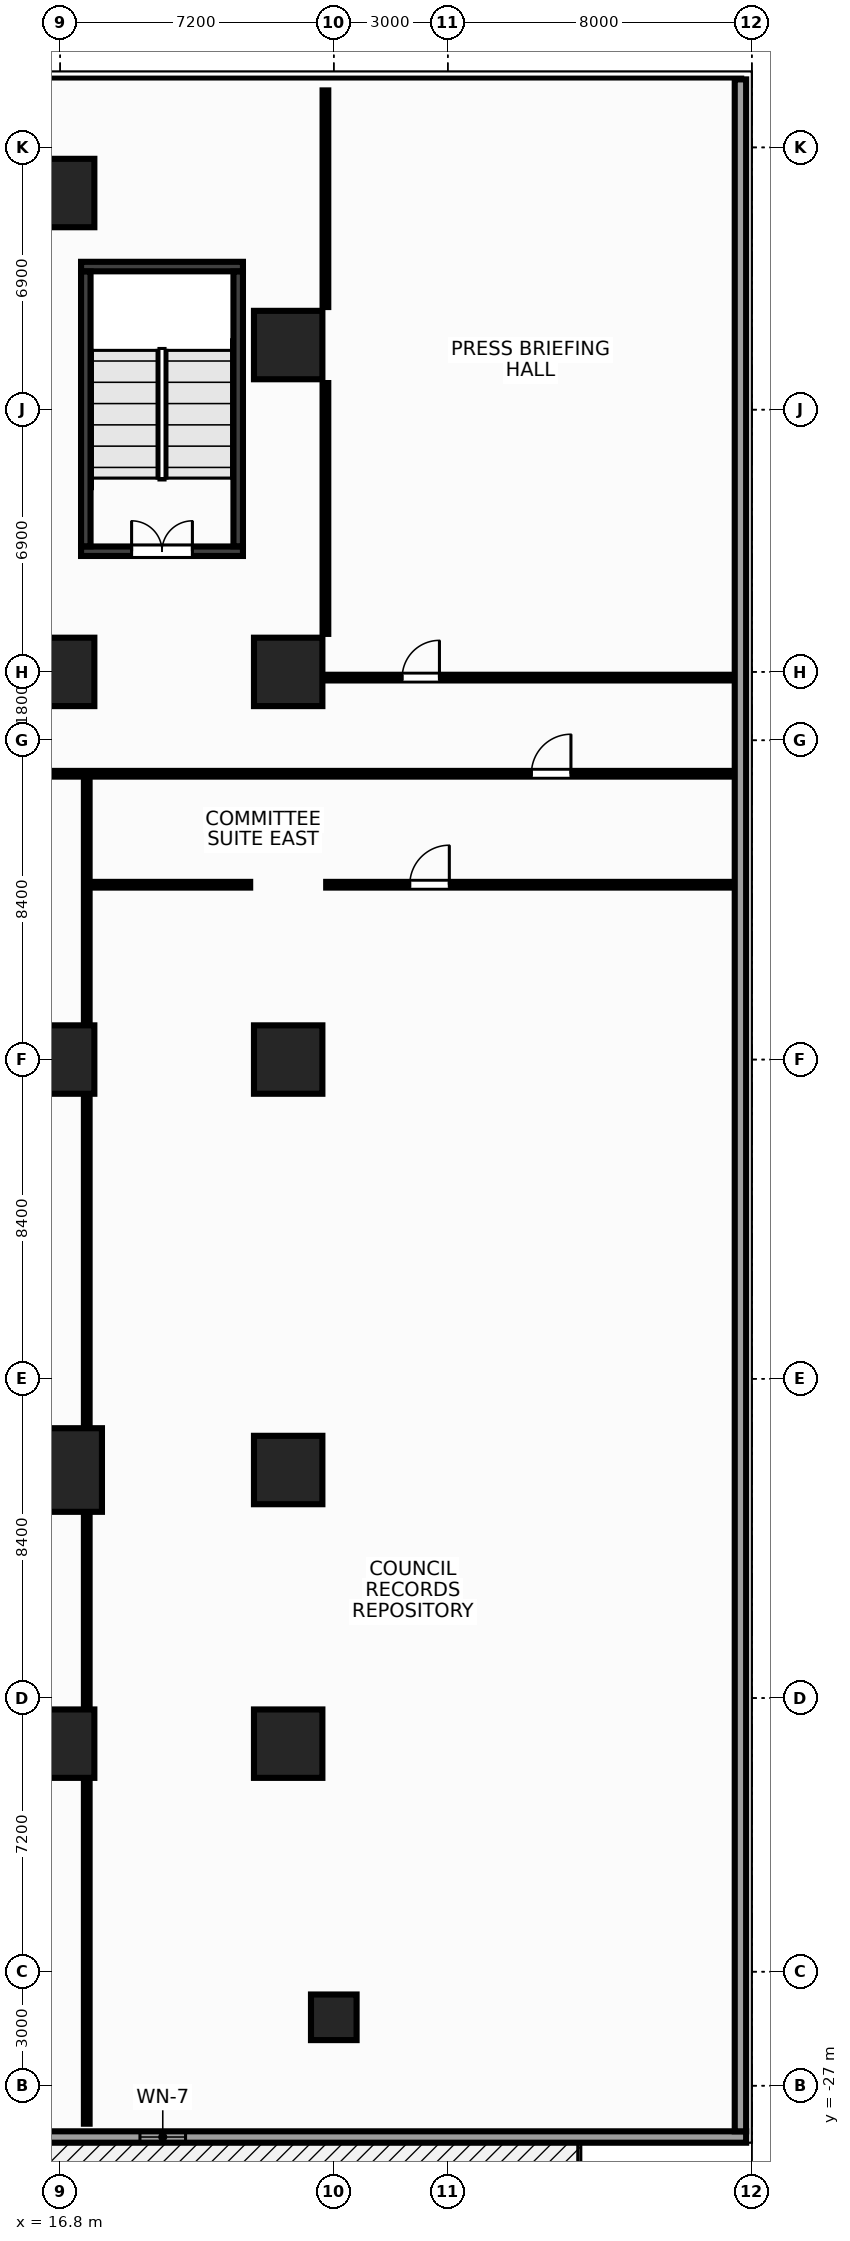
"""IFC4 building model, lengths in metres.
Left out: names, types, materials, properties, quantities, classifications, styles, units other than length and angle.
Written with IfcOpenShell. Run it as: python <this file> out.ifc"""

import sys

from ifc_helpers import new_model, si_unit, direction, frame, frame_2d, origin, origin_2d, place, context, subcontext, project, spatial, rectangle, hollow_rectangle, extrude, source, transform, mapped, element, fill, save


model = new_model("IFC4")
c1 = context("Model", 3, precision=1e-05, world=origin(), true_north=direction((0.0, 1.0)))
c2 = subcontext(c1, "Body", "Model", "MODEL_VIEW")
j1 = project(units=[si_unit("LENGTHUNIT", "METRE"), si_unit("PLANEANGLEUNIT", "RADIAN")], contexts=[c1])
p1 = place(None, origin())
s1 = spatial("IfcSite", under=j1, at=p1, CompositionType="ELEMENT")
p2 = place(p1, origin())
s2 = spatial("IfcBuilding", under=s1, at=p2, CompositionType="ELEMENT")
p3 = place(p2, frame((0.0, 0.0, 9.65)))
s3 = spatial("IfcBuildingStorey", under=s2, at=p3, CompositionType="ELEMENT", Elevation=9.65)
m1 = source(origin(), c2, "Body", "SweptSolid", [
    extrude(rectangle(XDim=4.26, YDim=0.25, at=frame_2d((2.13, 0.0))), origin(), (0.0, 0.0, 1.0), 4.65),
])
p4 = place(p3, frame((17.35, 20.865, 0.0), z_axis=(0.0, 0.0, 1.0), x_axis=(1.0, 0.0, 0.0)))
e1 = element("IfcWall", 1, at=p4, inside=s3, PredefinedType="SHEAR", context=c2, shape_type="MappedRepresentation", body=[
    mapped(m1, transform((0.0, 0.0, 0.0), x_axis=(1.0, 0.0, 0.0), y_axis=(0.0, 1.0, 0.0), z_axis=(0.0, 0.0, 1.0), scale=1.0)),
])
p5 = place(p3, frame((17.35, 13.375, 0.0), z_axis=(0.0, 0.0, 1.0), x_axis=(1.0, 0.0, 0.0)))
e2 = element("IfcWall", 2, at=p5, inside=s3, PredefinedType="SHEAR", context=c2, shape_type="MappedRepresentation", body=[
    mapped(m1, transform((0.0, 0.0, 0.0), x_axis=(1.0, 0.0, 0.0), y_axis=(0.0, 1.0, 0.0), z_axis=(0.0, 0.0, 1.0), scale=1.0)),
])
p6 = place(p5, frame((1.33, 0.0, 0.0)))
e3 = element("IfcOpeningElement", 3, at=p6, cuts=e2, PredefinedType="OPENING", context=c2, shape_type="SweptSolid", body=[
    extrude(rectangle(XDim=1.6, YDim=2.15, at=frame_2d((0.8, 1.075))), frame((0.0, 0.137, 0.0), z_axis=(0.0, -1.0, 0.0), x_axis=(1.0, 0.0, 0.0)), (0.0, 0.0, 1.0), 0.274),
])
m2 = source(origin(), c2, "Body", "SweptSolid", [
    extrude(rectangle(XDim=7.23, YDim=0.25, at=frame_2d((3.615, 0.0))), origin(), (0.0, 0.0, 1.0), 4.65),
])
for number, where, z_axis, x_axis in (
    (4, (17.475, 13.505, 0.0), (0.0, 0.0, 1.0), (0.0, 1.0, 0.0)),
    (5, (21.485, 13.505, 0.0), (0.0, 0.0, 1.0), (0.0, 1.0, 0.0)),
):
    element("IfcWall", number, at=place(p3, frame(where, z_axis=z_axis, x_axis=x_axis)), inside=s3, PredefinedType="SHEAR", context=c2, shape_type="MappedRepresentation", body=[
        mapped(m2, transform((0.0, 0.0, 0.0), x_axis=(1.0, 0.0, 0.0), y_axis=(0.0, 1.0, 0.0), z_axis=(0.0, 0.0, 1.0), scale=1.0)),
    ])
m3 = source(origin(), c2, "Body", "SweptSolid", [
    extrude(hollow_rectangle(XDim=1.2, YDim=1.2, WallThickness=0.055, at=origin_2d()), origin(), (0.0, 0.0, 1.0), 4.62),
])
p7 = place(p3, frame((24.0, -25.2, 0.0), z_axis=(0.0, 0.0, 1.0), x_axis=(1.0, 0.0, 0.0)))
e6 = element("IfcColumn", 6, at=p7, inside=s3, PredefinedType="COLUMN", context=c2, shape_type="MappedRepresentation", body=[
    mapped(m3, transform((0.0, 0.0, 0.0), x_axis=(1.0, 0.0, 0.0), y_axis=(0.0, 1.0, 0.0), z_axis=(0.0, 0.0, 1.0), scale=1.0)),
])
m4 = source(origin(), c2, "Body", "SweptSolid", [
    extrude(rectangle(XDim=1.8, YDim=1.8, at=origin_2d()), origin(), (0.0, 0.0, 1.0), 4.65),
])
p8 = place(p3, frame((16.8, -18.0, 0.0), z_axis=(0.0, 0.0, 1.0), x_axis=(1.0, 0.0, 0.0)))
e7 = element("IfcColumn", 7, at=p8, inside=s3, PredefinedType="COLUMN", context=c2, shape_type="MappedRepresentation", body=[
    mapped(m4, transform((0.0, 0.0, 0.0), x_axis=(1.0, 0.0, 0.0), y_axis=(0.0, 1.0, 0.0), z_axis=(0.0, 0.0, 1.0), scale=1.0)),
])
m5 = source(origin(), c2, "Body", "SweptSolid", [
    extrude(rectangle(XDim=2.2, YDim=2.2, at=origin_2d()), origin(), (0.0, 0.0, 1.0), 4.65),
])
p9 = place(p3, frame((16.8, -10.8, 0.0), z_axis=(0.0, 0.0, 1.0), x_axis=(1.0, 0.0, 0.0)))
e8 = element("IfcColumn", 8, at=p9, inside=s3, PredefinedType="COLUMN", context=c2, shape_type="MappedRepresentation", body=[
    mapped(m5, transform((0.0, 0.0, 0.0), x_axis=(1.0, 0.0, 0.0), y_axis=(0.0, 1.0, 0.0), z_axis=(0.0, 0.0, 1.0), scale=1.0)),
])
for number, where, z_axis, x_axis in (
    (9, (16.8, 0.0, 0.0), (0.0, 0.0, 1.0), (1.0, 0.0, 0.0)),
    (10, (16.8, 10.2, 0.0), (0.0, 0.0, 1.0), (1.0, 0.0, 0.0)),
    (11, (16.8, 22.8, 0.0), (0.0, 0.0, 1.0), (1.0, 0.0, 0.0)),
    (12, (22.8, -18.0, 0.0), (0.0, 0.0, 1.0), (1.0, 0.0, 0.0)),
    (13, (22.8, -10.8, 0.0), (0.0, 0.0, 1.0), (1.0, 0.0, 0.0)),
    (14, (22.8, 0.0, 0.0), (0.0, 0.0, 1.0), (1.0, 0.0, 0.0)),
    (15, (22.8, 10.2, 0.0), (0.0, 0.0, 1.0), (1.0, 0.0, 0.0)),
    (16, (22.8, 18.8, 0.0), (0.0, 0.0, 1.0), (1.0, 0.0, 0.0)),
):
    element("IfcColumn", number, at=place(p3, frame(where, z_axis=z_axis, x_axis=x_axis)), inside=s3, PredefinedType="COLUMN", context=c2, shape_type="MappedRepresentation", body=[
        mapped(m4, transform((0.0, 0.0, 0.0), x_axis=(1.0, 0.0, 0.0), y_axis=(0.0, 1.0, 0.0), z_axis=(0.0, 0.0, 1.0), scale=1.0)),
    ])
m6 = source(origin(), c2, "Body", "SweptSolid", [
    extrude(rectangle(XDim=69.7, YDim=0.3, at=frame_2d((34.85, 0.0))), origin(), (0.0, 0.0, 1.0), 3.87),
])
p10 = place(p3, frame((34.85, -28.35, 0.0), z_axis=(0.0, 0.0, 1.0), x_axis=(-1.0, 0.0, 0.0)))
e17 = element("IfcWall", 17, at=p10, inside=s3, PredefinedType="STANDARD", context=c2, shape_type="MappedRepresentation", body=[
    mapped(m6, transform((0.0, 0.0, 0.0), x_axis=(1.0, 0.0, 0.0), y_axis=(0.0, 1.0, 0.0), z_axis=(0.0, 0.0, 1.0), scale=1.0)),
])
p11 = place(p10, frame((14.75, 0.0, 0.9)))
e18 = element("IfcOpeningElement", 18, at=p11, cuts=e17, PredefinedType="OPENING", context=c2, shape_type="SweptSolid", body=[
    extrude(rectangle(XDim=1.2, YDim=2.0, at=frame_2d((0.6, 1.0))), frame((0.0, 0.162, 0.0), z_axis=(0.0, -1.0, 0.0), x_axis=(1.0, 0.0, 0.0)), (0.0, 0.0, 1.0), 0.324),
])
p12 = place(p10, frame((21.25, 0.0, 0.9)))
e19 = element("IfcOpeningElement", 19, at=p12, cuts=e17, PredefinedType="OPENING", context=c2, shape_type="SweptSolid", body=[
    extrude(rectangle(XDim=1.2, YDim=2.0, at=frame_2d((0.6, 1.0))), frame((0.0, 0.162, 0.0), z_axis=(0.0, -1.0, 0.0), x_axis=(1.0, 0.0, 0.0)), (0.0, 0.0, 1.0), 0.324),
])
p13 = place(p10, frame((47.25, 0.0, 0.9)))
e20 = element("IfcOpeningElement", 20, at=p13, cuts=e17, PredefinedType="OPENING", context=c2, shape_type="SweptSolid", body=[
    extrude(rectangle(XDim=1.2, YDim=2.0, at=frame_2d((0.6, 1.0))), frame((0.0, 0.162, 0.0), z_axis=(0.0, -1.0, 0.0), x_axis=(1.0, 0.0, 0.0)), (0.0, 0.0, 1.0), 0.324),
])
p14 = place(p10, frame((53.75, 0.0, 0.9)))
e21 = element("IfcOpeningElement", 21, at=p14, cuts=e17, PredefinedType="OPENING", context=c2, shape_type="SweptSolid", body=[
    extrude(rectangle(XDim=1.2, YDim=2.0, at=frame_2d((0.6, 1.0))), frame((0.0, 0.162, 0.0), z_axis=(0.0, -1.0, 0.0), x_axis=(1.0, 0.0, 0.0)), (0.0, 0.0, 1.0), 0.324),
])
p15 = place(p10, frame((30.35, 0.0, 0.0)))
e22 = element("IfcOpeningElement", 22, at=p15, cuts=e17, PredefinedType="OPENING", context=c2, shape_type="SweptSolid", body=[
    extrude(rectangle(XDim=1.8, YDim=2.2, at=frame_2d((0.9, 1.1))), frame((0.0, 0.162, 0.0), z_axis=(0.0, -1.0, 0.0), x_axis=(1.0, 0.0, 0.0)), (0.0, 0.0, 1.0), 0.324),
])
p16 = place(p10, frame((38.35, 0.0, 0.0)))
e23 = element("IfcOpeningElement", 23, at=p16, cuts=e17, PredefinedType="OPENING", context=c2, shape_type="SweptSolid", body=[
    extrude(rectangle(XDim=1.8, YDim=2.2, at=frame_2d((0.9, 1.1))), frame((0.0, 0.162, 0.0), z_axis=(0.0, -1.0, 0.0), x_axis=(1.0, 0.0, 0.0)), (0.0, 0.0, 1.0), 0.324),
])
m7 = source(origin(), c2, "Body", "SweptSolid", [
    extrude(rectangle(XDim=53.99, YDim=0.3, at=frame_2d((26.995, 0.0))), origin(), (0.0, 0.0, 1.0), 3.87),
])
p17 = place(p3, frame((34.7, 25.79, 0.0), z_axis=(0.0, 0.0, 1.0), x_axis=(0.0, -1.0, 0.0)))
e24 = element("IfcWall", 24, at=p17, inside=s3, PredefinedType="STANDARD", context=c2, shape_type="MappedRepresentation", body=[
    mapped(m7, transform((0.0, 0.0, 0.0), x_axis=(1.0, 0.0, 0.0), y_axis=(0.0, 1.0, 0.0), z_axis=(0.0, 0.0, 1.0), scale=1.0)),
])
m8 = source(origin(), c2, "Body", "SweptSolid", [
    extrude(rectangle(XDim=69.0, YDim=0.15, at=frame_2d((34.5, 0.0))), origin(), (0.0, 0.0, 1.0), 3.755),
])
p18 = place(p3, frame((-34.5, 7.52, 0.0), z_axis=(0.0, 0.0, 1.0), x_axis=(1.0, 0.0, 0.0)))
e25 = element("IfcWall", 25, at=p18, inside=s3, PredefinedType="PARTITIONING", context=c2, shape_type="MappedRepresentation", body=[
    mapped(m8, transform((0.0, 0.0, 0.0), x_axis=(1.0, 0.0, 0.0), y_axis=(0.0, 1.0, 0.0), z_axis=(0.0, 0.0, 1.0), scale=1.0)),
])
p19 = place(p18, frame((4.2, 0.0, 0.0)))
e26 = element("IfcOpeningElement", 26, at=p19, cuts=e25, PredefinedType="OPENING", context=c2, shape_type="SweptSolid", body=[
    extrude(rectangle(XDim=1.04, YDim=2.2, at=frame_2d((0.52, 1.1))), frame((0.0, 0.087, 0.0), z_axis=(0.0, -1.0, 0.0), x_axis=(1.0, 0.0, 0.0)), (0.0, 0.0, 1.0), 0.174),
])
p20 = place(p18, frame((33.7, 0.0, 0.0)))
e27 = element("IfcOpeningElement", 27, at=p20, cuts=e25, PredefinedType="OPENING", context=c2, shape_type="SweptSolid", body=[
    extrude(rectangle(XDim=1.65, YDim=2.35, at=frame_2d((0.825, 1.175))), frame((0.0, 0.087, 0.0), z_axis=(0.0, -1.0, 0.0), x_axis=(1.0, 0.0, 0.0)), (0.0, 0.0, 1.0), 0.174),
])
p21 = place(p18, frame((63.7, 0.0, 0.0)))
e28 = element("IfcOpeningElement", 28, at=p21, cuts=e25, PredefinedType="OPENING", context=c2, shape_type="SweptSolid", body=[
    extrude(rectangle(XDim=1.04, YDim=2.2, at=frame_2d((0.52, 1.1))), frame((0.0, 0.087, 0.0), z_axis=(0.0, -1.0, 0.0), x_axis=(1.0, 0.0, 0.0)), (0.0, 0.0, 1.0), 0.174),
])
m9 = source(origin(), c2, "Body", "SweptSolid", [
    extrude(rectangle(XDim=10.7, YDim=0.15, at=frame_2d((5.35, 0.0))), origin(), (0.0, 0.0, 1.0), 4.37),
])
p22 = place(p3, frame((23.8, 10.05, 0.0), z_axis=(0.0, 0.0, 1.0), x_axis=(1.0, 0.0, 0.0)))
e29 = element("IfcWall", 29, at=p22, inside=s3, PredefinedType="PARTITIONING", context=c2, shape_type="MappedRepresentation", body=[
    mapped(m9, transform((0.0, 0.0, 0.0), x_axis=(1.0, 0.0, 0.0), y_axis=(0.0, 1.0, 0.0), z_axis=(0.0, 0.0, 1.0), scale=1.0)),
])
p23 = place(p22, frame((2.0, 0.0, 0.0)))
e30 = element("IfcOpeningElement", 30, at=p23, cuts=e29, PredefinedType="OPENING", context=c2, shape_type="SweptSolid", body=[
    extrude(rectangle(XDim=0.98, YDim=2.15, at=frame_2d((0.49, 1.075))), frame((0.0, 0.087, 0.0), z_axis=(0.0, -1.0, 0.0), x_axis=(1.0, 0.0, 0.0)), (0.0, 0.0, 1.0), 0.174),
])
m10 = source(origin(), c2, "Body", "SweptSolid", [
    extrude(rectangle(XDim=6.6, YDim=0.15, at=frame_2d((3.3, 0.0))), origin(), (0.0, 0.0, 1.0), 4.37),
])
p24 = place(p3, frame((23.78, 11.2, 0.0), z_axis=(0.0, 0.0, 1.0), x_axis=(0.0, 1.0, 0.0)))
e31 = element("IfcWall", 31, at=p24, inside=s3, PredefinedType="PARTITIONING", context=c2, shape_type="MappedRepresentation", body=[
    mapped(m10, transform((0.0, 0.0, 0.0), x_axis=(1.0, 0.0, 0.0), y_axis=(0.0, 1.0, 0.0), z_axis=(0.0, 0.0, 1.0), scale=1.0)),
])
m11 = source(origin(), c2, "Body", "SweptSolid", [
    extrude(rectangle(XDim=5.7, YDim=0.15, at=frame_2d((2.85, 0.0))), origin(), (0.0, 0.0, 1.0), 4.37),
])
p25 = place(p3, frame((23.78, 19.8, 0.0), z_axis=(0.0, 0.0, 1.0), x_axis=(0.0, 1.0, 0.0)))
e32 = element("IfcWall", 32, at=p25, inside=s3, PredefinedType="PARTITIONING", context=c2, shape_type="MappedRepresentation", body=[
    mapped(m11, transform((0.0, 0.0, 0.0), x_axis=(1.0, 0.0, 0.0), y_axis=(0.0, 1.0, 0.0), z_axis=(0.0, 0.0, 1.0), scale=1.0)),
])
m12 = source(origin(), c2, "Body", "SweptSolid", [
    extrude(rectangle(XDim=35.38, YDim=0.15, at=frame_2d((17.69, 0.0))), origin(), (0.0, 0.0, 1.0), 3.655),
])
p26 = place(p3, frame((17.5, -28.0, 0.0), z_axis=(0.0, 0.0, 1.0), x_axis=(0.0, 1.0, 0.0)))
e33 = element("IfcWall", 33, at=p26, inside=s3, PredefinedType="PARTITIONING", context=c2, shape_type="MappedRepresentation", body=[
    mapped(m12, transform((0.0, 0.0, 0.0), x_axis=(1.0, 0.0, 0.0), y_axis=(0.0, 1.0, 0.0), z_axis=(0.0, 0.0, 1.0), scale=1.0)),
])
m13 = source(origin(), c2, "Body", "SweptSolid", [
    extrude(rectangle(XDim=4.18, YDim=0.15, at=frame_2d((2.09, 0.0))), origin(), (0.0, 0.0, 1.0), 4.37),
])
p27 = place(p3, frame((17.62, 4.6, 0.0), z_axis=(0.0, 0.0, 1.0), x_axis=(1.0, 0.0, 0.0)))
e34 = element("IfcWall", 34, at=p27, inside=s3, PredefinedType="PARTITIONING", context=c2, shape_type="MappedRepresentation", body=[
    mapped(m13, transform((0.0, 0.0, 0.0), x_axis=(1.0, 0.0, 0.0), y_axis=(0.0, 1.0, 0.0), z_axis=(0.0, 0.0, 1.0), scale=1.0)),
])
p28 = place(p3, frame((23.8, 4.6, 0.0), z_axis=(0.0, 0.0, 1.0), x_axis=(1.0, 0.0, 0.0)))
e35 = element("IfcWall", 35, at=p28, inside=s3, PredefinedType="PARTITIONING", context=c2, shape_type="MappedRepresentation", body=[
    mapped(m9, transform((0.0, 0.0, 0.0), x_axis=(1.0, 0.0, 0.0), y_axis=(0.0, 1.0, 0.0), z_axis=(0.0, 0.0, 1.0), scale=1.0)),
])
p29 = place(p28, frame((2.2, 0.0, 0.0)))
e36 = element("IfcOpeningElement", 36, at=p29, cuts=e35, PredefinedType="OPENING", context=c2, shape_type="SweptSolid", body=[
    extrude(rectangle(XDim=1.04, YDim=2.2, at=frame_2d((0.52, 1.1))), frame((0.0, 0.087, 0.0), z_axis=(0.0, -1.0, 0.0), x_axis=(1.0, 0.0, 0.0)), (0.0, 0.0, 1.0), 0.174),
])
m14 = source(origin(), c2, "Body", "SweptSolid", [
    extrude(rectangle(XDim=1.2, YDim=2.0, at=frame_2d((0.6, 1.0))), frame((0.0, 0.03, 0.0), z_axis=(0.0, -1.0, 0.0), x_axis=(1.0, 0.0, 0.0)), (0.0, 0.0, 1.0), 0.06),
])
p30 = place(p11, origin())
e37 = element("IfcWindow", 37, at=p30, inside=s3, PartitioningType="SINGLE_PANEL", PredefinedType="WINDOW", context=c2, shape_type="MappedRepresentation", body=[
    mapped(m14, transform((0.0, 0.0, 0.0), x_axis=(1.0, 0.0, 0.0), y_axis=(0.0, 1.0, 0.0), z_axis=(0.0, 0.0, 1.0), scale=1.0)),
])
fill(e18, e37)
m15 = source(origin(), c2, "Body", "SweptSolid", [
    extrude(rectangle(XDim=1.6, YDim=2.15, at=frame_2d((0.8, 1.075))), frame((0.0, 0.025, 0.0), z_axis=(0.0, -1.0, 0.0), x_axis=(1.0, 0.0, 0.0)), (0.0, 0.0, 1.0), 0.05),
])
p31 = place(p6, origin())
e38 = element("IfcDoor", 38, at=p31, inside=s3, OperationType="DOUBLE_DOOR_SINGLE_SWING", PredefinedType="DOOR", context=c2, shape_type="MappedRepresentation", body=[
    mapped(m15, transform((0.0, 0.0, 0.0), x_axis=(1.0, 0.0, 0.0), y_axis=(0.0, 1.0, 0.0), z_axis=(0.0, 0.0, 1.0), scale=1.0)),
])
fill(e3, e38)
m16 = source(origin(), c2, "Body", "SweptSolid", [
    extrude(rectangle(XDim=1.04, YDim=2.2, at=frame_2d((0.52, 1.1))), frame((0.0, 0.025, 0.0), z_axis=(0.0, -1.0, 0.0), x_axis=(1.0, 0.0, 0.0)), (0.0, 0.0, 1.0), 0.05),
])
p32 = place(p21, origin())
e39 = element("IfcDoor", 39, at=p32, inside=s3, OperationType="SINGLE_SWING_RIGHT", PredefinedType="DOOR", context=c2, shape_type="MappedRepresentation", body=[
    mapped(m16, transform((0.0, 0.0, 0.0), x_axis=(1.0, 0.0, 0.0), y_axis=(0.0, 1.0, 0.0), z_axis=(0.0, 0.0, 1.0), scale=1.0)),
])
fill(e28, e39)
p33 = place(p29, origin())
e40 = element("IfcDoor", 40, at=p33, inside=s3, OperationType="SINGLE_SWING_RIGHT", PredefinedType="DOOR", context=c2, shape_type="MappedRepresentation", body=[
    mapped(m16, transform((0.0, 0.0, 0.0), x_axis=(1.0, 0.0, 0.0), y_axis=(0.0, 1.0, 0.0), z_axis=(0.0, 0.0, 1.0), scale=1.0)),
])
fill(e36, e40)
m17 = source(origin(), c2, "Body", "SweptSolid", [
    extrude(rectangle(XDim=0.98, YDim=2.15, at=frame_2d((0.49, 1.075))), frame((0.0, 0.025, 0.0), z_axis=(0.0, -1.0, 0.0), x_axis=(1.0, 0.0, 0.0)), (0.0, 0.0, 1.0), 0.05),
])
p34 = place(p23, origin())
e41 = element("IfcDoor", 41, at=p34, inside=s3, OperationType="SINGLE_SWING_RIGHT", PredefinedType="DOOR", context=c2, shape_type="MappedRepresentation", body=[
    mapped(m17, transform((0.0, 0.0, 0.0), x_axis=(1.0, 0.0, 0.0), y_axis=(0.0, 1.0, 0.0), z_axis=(0.0, 0.0, 1.0), scale=1.0)),
])
fill(e30, e41)
save(model, sys.argv[1])
